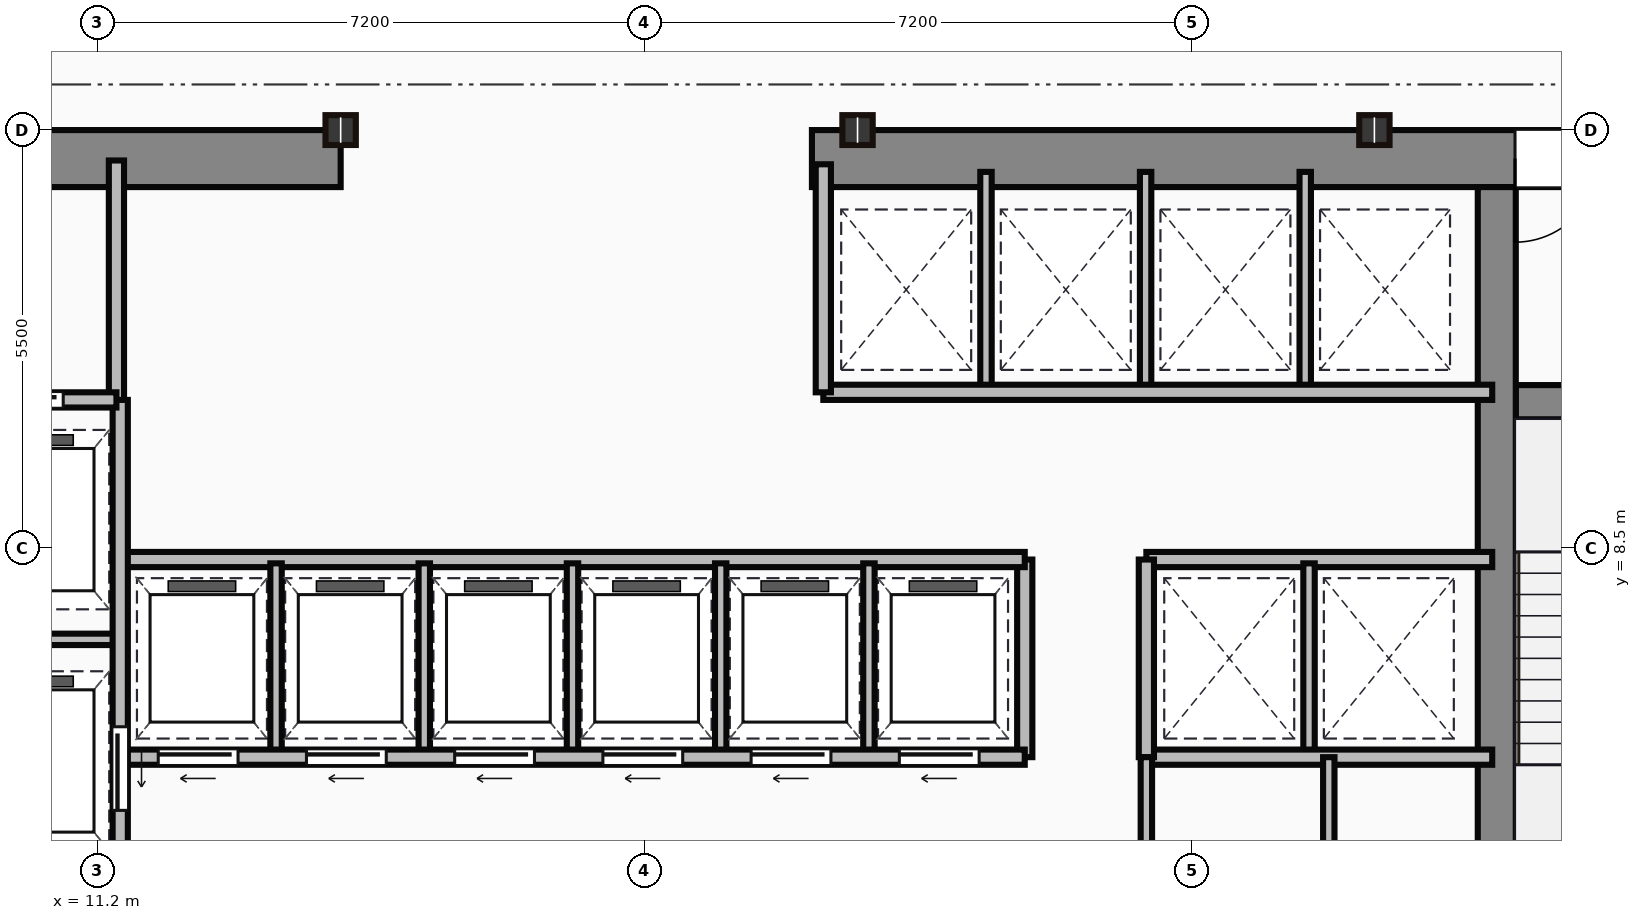
"""IFC4 building model, lengths in metres.
Left out: names, types, materials, properties, quantities, classifications, styles, units other than length and angle.
Written with IfcOpenShell. Run it as: python <this file> out.ifc"""

import sys

from ifc_helpers import new_model, si_unit, direction, frame, frame_2d, origin, origin_2d, place, context, subcontext, project, spatial, rectangle, i_section, extrude, source, transform, mapped, element, fill, save


model = new_model("IFC4")
c1 = context("Model", 3, precision=1e-05, world=origin(), true_north=direction((0.0, 1.0)))
c2 = subcontext(c1, "Body", "Model", "MODEL_VIEW")
j1 = project(units=[si_unit("LENGTHUNIT", "METRE"), si_unit("PLANEANGLEUNIT", "RADIAN")], contexts=[c1])
p1 = place(None, origin())
s1 = spatial("IfcSite", under=j1, at=p1, CompositionType="ELEMENT")
p2 = place(p1, origin())
s2 = spatial("IfcBuilding", under=s1, at=p2, CompositionType="ELEMENT")
p3 = place(p2, frame((0.0, 0.0, 114.2)))
s3 = spatial("IfcBuildingStorey", under=s2, at=p3, CompositionType="ELEMENT", Elevation=114.2)
m1 = source(origin(), c2, "Body", "SweptSolid", [
    extrude(rectangle(XDim=9.1, YDim=0.75, at=frame_2d((4.55, 0.0))), origin(), (0.0, 0.0, 1.0), 3.65),
])
p4 = place(p3, frame((5.3, 13.625, 0.0), z_axis=(0.0, 0.0, 1.0), x_axis=(1.0, 0.0, 0.0)))
e1 = element("IfcWall", 1, at=p4, inside=s3, PredefinedType="SHEAR", context=c2, shape_type="MappedRepresentation", body=[
    mapped(m1, transform((0.0, 0.0, 0.0))),
])
p5 = place(p4, frame((4.1, 0.0, 0.0)))
e2 = element("IfcOpeningElement", 2, at=p5, cuts=e1, PredefinedType="OPENING", context=c2, shape_type="SweptSolid", body=[
    extrude(rectangle(XDim=1.1, YDim=2.15, at=frame_2d((0.55, 1.075))), frame((0.0, 0.385, 0.0), z_axis=(0.0, -1.0, 0.0), x_axis=(1.0, 0.0, 0.0)), (0.0, 0.0, 1.0), 0.77),
])
m2 = source(origin(), c2, "Body", "SweptSolid", [
    extrude(rectangle(XDim=12.6, YDim=0.75, at=frame_2d((6.3, 0.0))), origin(), (0.0, 0.0, 1.0), 3.65),
])
p6 = place(p3, frame((20.6, 13.625, 0.0), z_axis=(0.0, 0.0, 1.0), x_axis=(1.0, 0.0, 0.0)))
e3 = element("IfcWall", 3, at=p6, inside=s3, PredefinedType="SHEAR", context=c2, shape_type="MappedRepresentation", body=[
    mapped(m2, transform((0.0, 0.0, 0.0))),
])
p7 = place(p6, frame((9.25, 0.0, 0.0)))
e4 = element("IfcOpeningElement", 4, at=p7, cuts=e3, PredefinedType="OPENING", context=c2, shape_type="SweptSolid", body=[
    extrude(rectangle(XDim=1.1, YDim=2.15, at=frame_2d((0.55, 1.075))), frame((0.0, 0.385, 0.0), z_axis=(0.0, -1.0, 0.0), x_axis=(1.0, 0.0, 0.0)), (0.0, 0.0, 1.0), 0.77),
])
m3 = source(origin(), c2, "Body", "SweptSolid", [
    extrude(rectangle(XDim=12.35, YDim=0.5, at=frame_2d((6.175, 0.0))), origin(), (0.0, 0.0, 1.0), 3.65),
])
p8 = place(p3, frame((29.61, 0.9, 0.0), z_axis=(0.0, 0.0, 1.0), x_axis=(0.0, 1.0, 0.0)))
e5 = element("IfcWall", 5, at=p8, inside=s3, PredefinedType="SHEAR", context=c2, shape_type="MappedRepresentation", body=[
    mapped(m3, transform((0.0, 0.0, 0.0))),
])
m4 = source(origin(), c2, "Body", "SweptSolid", [
    extrude(rectangle(XDim=3.39, YDim=0.45, at=frame_2d((1.695, 0.0))), origin(), (0.0, 0.0, 1.0), 3.65),
])
p9 = place(p3, frame((29.86, 10.42, 0.0), z_axis=(0.0, 0.0, 1.0), x_axis=(1.0, 0.0, 0.0)))
e6 = element("IfcWall", 6, at=p9, inside=s3, PredefinedType="SHEAR", context=c2, shape_type="MappedRepresentation", body=[
    mapped(m4, transform((0.0, 0.0, 0.0))),
])
p10 = place(p9, frame((1.1, 0.0, 0.0)))
e7 = element("IfcOpeningElement", 7, at=p10, cuts=e6, PredefinedType="OPENING", context=c2, shape_type="SweptSolid", body=[
    extrude(rectangle(XDim=1.1, YDim=2.15, at=frame_2d((0.55, 1.075))), frame((0.0, 0.235, 0.0), z_axis=(0.0, -1.0, 0.0), x_axis=(1.0, 0.0, 0.0)), (0.0, 0.0, 1.0), 0.47),
])
m5 = source(origin(), c2, "Body", "SweptSolid", [
    extrude(i_section(OverallWidth=0.399, OverallDepth=0.393, WebThickness=0.023, FlangeThickness=0.037, at=origin_2d()), origin(), (0.0, 0.0, 1.0), 3.65),
])
for number, where, z_axis, x_axis in (
    (8, (14.4, 14.0, 0.0), (0.0, 0.0, 1.0), (1.0, 0.0, 0.0)),
    (9, (21.2, 14.0, 0.0), (0.0, 0.0, 1.0), (1.0, 0.0, 0.0)),
    (10, (28.0, 14.0, 0.0), (0.0, 0.0, 1.0), (1.0, 0.0, 0.0)),
):
    element("IfcColumn", number, at=place(p3, frame(where, z_axis=z_axis, x_axis=x_axis)), inside=s3, PredefinedType="COLUMN", context=c2, shape_type="MappedRepresentation", body=[
        mapped(m5, transform((0.0, 0.0, 0.0))),
    ])
m6 = source(origin(), c2, "Body", "SweptSolid", [
    extrude(rectangle(XDim=3.18, YDim=0.2, at=frame_2d((1.59, 0.0))), origin(), (0.0, 0.0, 1.0), 3.4),
])
p11 = place(p3, frame((11.45, 10.42, 0.0), z_axis=(0.0, 0.0, 1.0), x_axis=(0.0, 1.0, 0.0)))
e11 = element("IfcWall", 11, at=p11, inside=s3, PredefinedType="PARTITIONING", context=c2, shape_type="MappedRepresentation", body=[
    mapped(m6, transform((0.0, 0.0, 0.0))),
])
m7 = source(origin(), c2, "Body", "SweptSolid", [
    extrude(rectangle(XDim=2.35, YDim=0.2, at=frame_2d((1.175, 0.0))), origin(), (0.0, 0.0, 1.0), 3.4),
])
p12 = place(p3, frame((9.1, 10.45, 0.0), z_axis=(0.0, 0.0, 1.0), x_axis=(1.0, 0.0, 0.0)))
e12 = element("IfcWall", 12, at=p12, inside=s3, PredefinedType="PARTITIONING", context=c2, shape_type="MappedRepresentation", body=[
    mapped(m7, transform((0.0, 0.0, 0.0))),
])
p13 = place(p12, frame((0.55, 0.0, 0.0)))
e13 = element("IfcOpeningElement", 13, at=p13, cuts=e12, PredefinedType="OPENING", context=c2, shape_type="SweptSolid", body=[
    extrude(rectangle(XDim=1.1, YDim=2.15, at=frame_2d((0.55, 1.075))), frame((0.0, 0.11, 0.0), z_axis=(0.0, -1.0, 0.0), x_axis=(1.0, 0.0, 0.0)), (0.0, 0.0, 1.0), 0.22),
])
m8 = source(origin(), c2, "Body", "SweptSolid", [
    extrude(rectangle(XDim=9.6, YDim=0.2, at=frame_2d((4.8, 0.0))), origin(), (0.0, 0.0, 1.0), 3.4),
])
p14 = place(p3, frame((11.5, 0.85, 0.0), z_axis=(0.0, 0.0, 1.0), x_axis=(0.0, 1.0, 0.0)))
e14 = element("IfcWall", 14, at=p14, inside=s3, PredefinedType="PARTITIONING", context=c2, shape_type="MappedRepresentation", body=[
    mapped(m8, transform((0.0, 0.0, 0.0))),
])
p15 = place(p14, frame((4.2, 0.0, 0.0)))
e15 = element("IfcOpeningElement", 15, at=p15, cuts=e14, PredefinedType="OPENING", context=c2, shape_type="SweptSolid", body=[
    extrude(rectangle(XDim=1.1, YDim=2.15, at=frame_2d((0.55, 1.075))), frame((0.0, 0.11, 0.0), z_axis=(0.0, -1.0, 0.0), x_axis=(1.0, 0.0, 0.0)), (0.0, 0.0, 1.0), 0.22),
])
p16 = place(p14, frame((0.9, 0.0, 0.0)))
e16 = element("IfcOpeningElement", 16, at=p16, cuts=e14, PredefinedType="OPENING", context=c2, shape_type="SweptSolid", body=[
    extrude(rectangle(XDim=1.2, YDim=2.15, at=frame_2d((0.6, 1.075))), frame((0.0, 0.11, 0.0), z_axis=(0.0, -1.0, 0.0), x_axis=(1.0, 0.0, 0.0)), (0.0, 0.0, 1.0), 0.22),
])
m9 = source(origin(), c2, "Body", "SweptSolid", [
    extrude(rectangle(XDim=2.4, YDim=0.15, at=frame_2d((1.2, 0.0))), origin(), (0.0, 0.0, 1.0), 3.4),
])
p17 = place(p3, frame((9.1, 7.3, 0.0), z_axis=(0.0, 0.0, 1.0), x_axis=(1.0, 0.0, 0.0)))
e17 = element("IfcWall", 17, at=p17, inside=s3, PredefinedType="PARTITIONING", context=c2, shape_type="MappedRepresentation", body=[
    mapped(m9, transform((0.0, 0.0, 0.0))),
])
m10 = source(origin(), c2, "Body", "SweptSolid", [
    extrude(rectangle(XDim=11.85, YDim=0.2, at=frame_2d((5.925, 0.0))), origin(), (0.0, 0.0, 1.0), 3.4),
])
p18 = place(p3, frame((11.55, 5.75, 0.0), z_axis=(0.0, 0.0, 1.0), x_axis=(1.0, 0.0, 0.0)))
e18 = element("IfcWall", 18, at=p18, inside=s3, PredefinedType="PARTITIONING", context=c2, shape_type="MappedRepresentation", body=[
    mapped(m10, transform((0.0, 0.0, 0.0))),
])
p19 = place(p18, frame((0.45, 0.0, 0.0)))
e19 = element("IfcOpeningElement", 19, at=p19, cuts=e18, PredefinedType="OPENING", context=c2, shape_type="SweptSolid", body=[
    extrude(rectangle(XDim=1.05, YDim=2.15, at=frame_2d((0.525, 1.075))), frame((0.0, 0.11, 0.0), z_axis=(0.0, -1.0, 0.0), x_axis=(1.0, 0.0, 0.0)), (0.0, 0.0, 1.0), 0.22),
])
p20 = place(p18, frame((2.4, 0.0, 0.0)))
e20 = element("IfcOpeningElement", 20, at=p20, cuts=e18, PredefinedType="OPENING", context=c2, shape_type="SweptSolid", body=[
    extrude(rectangle(XDim=1.05, YDim=2.15, at=frame_2d((0.525, 1.075))), frame((0.0, 0.11, 0.0), z_axis=(0.0, -1.0, 0.0), x_axis=(1.0, 0.0, 0.0)), (0.0, 0.0, 1.0), 0.22),
])
p21 = place(p18, frame((4.35, 0.0, 0.0)))
e21 = element("IfcOpeningElement", 21, at=p21, cuts=e18, PredefinedType="OPENING", context=c2, shape_type="SweptSolid", body=[
    extrude(rectangle(XDim=1.05, YDim=2.15, at=frame_2d((0.525, 1.075))), frame((0.0, 0.11, 0.0), z_axis=(0.0, -1.0, 0.0), x_axis=(1.0, 0.0, 0.0)), (0.0, 0.0, 1.0), 0.22),
])
p22 = place(p18, frame((6.3, 0.0, 0.0)))
e22 = element("IfcOpeningElement", 22, at=p22, cuts=e18, PredefinedType="OPENING", context=c2, shape_type="SweptSolid", body=[
    extrude(rectangle(XDim=1.05, YDim=2.15, at=frame_2d((0.525, 1.075))), frame((0.0, 0.11, 0.0), z_axis=(0.0, -1.0, 0.0), x_axis=(1.0, 0.0, 0.0)), (0.0, 0.0, 1.0), 0.22),
])
p23 = place(p18, frame((8.25, 0.0, 0.0)))
e23 = element("IfcOpeningElement", 23, at=p23, cuts=e18, PredefinedType="OPENING", context=c2, shape_type="SweptSolid", body=[
    extrude(rectangle(XDim=1.05, YDim=2.15, at=frame_2d((0.525, 1.075))), frame((0.0, 0.11, 0.0), z_axis=(0.0, -1.0, 0.0), x_axis=(1.0, 0.0, 0.0)), (0.0, 0.0, 1.0), 0.22),
])
p24 = place(p18, frame((10.2, 0.0, 0.0)))
e24 = element("IfcOpeningElement", 24, at=p24, cuts=e18, PredefinedType="OPENING", context=c2, shape_type="SweptSolid", body=[
    extrude(rectangle(XDim=1.05, YDim=2.15, at=frame_2d((0.525, 1.075))), frame((0.0, 0.11, 0.0), z_axis=(0.0, -1.0, 0.0), x_axis=(1.0, 0.0, 0.0)), (0.0, 0.0, 1.0), 0.22),
])
p25 = place(p3, frame((11.55, 8.35, 0.0), z_axis=(0.0, 0.0, 1.0), x_axis=(1.0, 0.0, 0.0)))
e25 = element("IfcWall", 25, at=p25, inside=s3, PredefinedType="PARTITIONING", context=c2, shape_type="MappedRepresentation", body=[
    mapped(m10, transform((0.0, 0.0, 0.0))),
])
m11 = source(origin(), c2, "Body", "SweptSolid", [
    extrude(rectangle(XDim=2.6, YDim=0.2, at=frame_2d((1.3, 0.0))), origin(), (0.0, 0.0, 1.0), 3.4),
])
p26 = place(p3, frame((23.4, 5.75, 0.0), z_axis=(0.0, 0.0, 1.0), x_axis=(0.0, 1.0, 0.0)))
e26 = element("IfcWall", 26, at=p26, inside=s3, PredefinedType="PARTITIONING", context=c2, shape_type="MappedRepresentation", body=[
    mapped(m11, transform((0.0, 0.0, 0.0))),
])
m12 = source(origin(), c2, "Body", "SweptSolid", [
    extrude(rectangle(XDim=2.5, YDim=0.15, at=frame_2d((1.25, 0.0))), origin(), (0.0, 0.0, 1.0), 3.4),
])
for number, where, z_axis, x_axis in (
    (27, (13.55, 5.8, 0.0), (0.0, 0.0, 1.0), (0.0, 1.0, 0.0)),
    (28, (15.5, 5.8, 0.0), (0.0, 0.0, 1.0), (0.0, 1.0, 0.0)),
    (29, (17.45, 5.8, 0.0), (0.0, 0.0, 1.0), (0.0, 1.0, 0.0)),
    (30, (19.4, 5.8, 0.0), (0.0, 0.0, 1.0), (0.0, 1.0, 0.0)),
    (31, (21.35, 5.8, 0.0), (0.0, 0.0, 1.0), (0.0, 1.0, 0.0)),
):
    element("IfcWall", number, at=place(p3, frame(where, z_axis=z_axis, x_axis=x_axis)), inside=s3, PredefinedType="PARTITIONING", context=c2, shape_type="MappedRepresentation", body=[
        mapped(m12, transform((0.0, 0.0, 0.0))),
    ])
m13 = source(origin(), c2, "Body", "SweptSolid", [
    extrude(rectangle(XDim=8.8, YDim=0.2, at=frame_2d((4.4, 0.0))), origin(), (0.0, 0.0, 1.0), 3.4),
])
p27 = place(p3, frame((20.75, 10.55, 0.0), z_axis=(0.0, 0.0, 1.0), x_axis=(1.0, 0.0, 0.0)))
e32 = element("IfcWall", 32, at=p27, inside=s3, PredefinedType="PARTITIONING", context=c2, shape_type="MappedRepresentation", body=[
    mapped(m13, transform((0.0, 0.0, 0.0))),
])
m14 = source(origin(), c2, "Body", "SweptSolid", [
    extrude(rectangle(XDim=3.0, YDim=0.2, at=frame_2d((1.5, 0.0))), origin(), (0.0, 0.0, 1.0), 3.4),
])
p28 = place(p3, frame((20.75, 10.55, 0.0), z_axis=(0.0, 0.0, 1.0), x_axis=(0.0, 1.0, 0.0)))
e33 = element("IfcWall", 33, at=p28, inside=s3, PredefinedType="PARTITIONING", context=c2, shape_type="MappedRepresentation", body=[
    mapped(m14, transform((0.0, 0.0, 0.0))),
])
m15 = source(origin(), c2, "Body", "SweptSolid", [
    extrude(rectangle(XDim=2.85, YDim=0.15, at=frame_2d((1.425, 0.0))), origin(), (0.0, 0.0, 1.0), 3.4),
])
for number, where, z_axis, x_axis in (
    (34, (22.89, 10.6, 0.0), (0.0, 0.0, 1.0), (0.0, 1.0, 0.0)),
    (35, (24.99, 10.6, 0.0), (0.0, 0.0, 1.0), (0.0, 1.0, 0.0)),
    (36, (27.09, 10.6, 0.0), (0.0, 0.0, 1.0), (0.0, 1.0, 0.0)),
):
    element("IfcWall", number, at=place(p3, frame(where, z_axis=z_axis, x_axis=x_axis)), inside=s3, PredefinedType="PARTITIONING", context=c2, shape_type="MappedRepresentation", body=[
        mapped(m15, transform((0.0, 0.0, 0.0))),
    ])
m16 = source(origin(), c2, "Body", "SweptSolid", [
    extrude(rectangle(XDim=4.55, YDim=0.2, at=frame_2d((2.275, 0.0))), origin(), (0.0, 0.0, 1.0), 3.4),
])
for number, where, z_axis, x_axis in (
    (37, (25.0, 8.35, 0.0), (0.0, 0.0, 1.0), (1.0, 0.0, 0.0)),
    (38, (25.0, 5.75, 0.0), (0.0, 0.0, 1.0), (1.0, 0.0, 0.0)),
):
    element("IfcWall", number, at=place(p3, frame(where, z_axis=z_axis, x_axis=x_axis)), inside=s3, PredefinedType="PARTITIONING", context=c2, shape_type="MappedRepresentation", body=[
        mapped(m16, transform((0.0, 0.0, 0.0))),
    ])
p29 = place(p3, frame((25.0, 5.75, 0.0), z_axis=(0.0, 0.0, 1.0), x_axis=(0.0, 1.0, 0.0)))
e39 = element("IfcWall", 39, at=p29, inside=s3, PredefinedType="PARTITIONING", context=c2, shape_type="MappedRepresentation", body=[
    mapped(m11, transform((0.0, 0.0, 0.0))),
])
p30 = place(p3, frame((27.14, 5.8, 0.0), z_axis=(0.0, 0.0, 1.0), x_axis=(0.0, 1.0, 0.0)))
e40 = element("IfcWall", 40, at=p30, inside=s3, PredefinedType="PARTITIONING", context=c2, shape_type="MappedRepresentation", body=[
    mapped(m12, transform((0.0, 0.0, 0.0))),
])
m17 = source(origin(), c2, "Body", "SweptSolid", [
    extrude(rectangle(XDim=4.9, YDim=0.15, at=frame_2d((2.45, 0.0))), origin(), (0.0, 0.0, 1.0), 3.4),
])
p31 = place(p3, frame((25.0, 0.85, 0.0), z_axis=(0.0, 0.0, 1.0), x_axis=(0.0, 1.0, 0.0)))
e41 = element("IfcWall", 41, at=p31, inside=s3, PredefinedType="PARTITIONING", context=c2, shape_type="MappedRepresentation", body=[
    mapped(m17, transform((0.0, 0.0, 0.0))),
])
p32 = place(p31, frame((2.5, 0.0, 0.0)))
e42 = element("IfcOpeningElement", 42, at=p32, cuts=e41, PredefinedType="OPENING", context=c2, shape_type="SweptSolid", body=[
    extrude(rectangle(XDim=0.95, YDim=2.15, at=frame_2d((0.475, 1.075))), frame((0.0, 0.085, 0.0), z_axis=(0.0, -1.0, 0.0), x_axis=(1.0, 0.0, 0.0)), (0.0, 0.0, 1.0), 0.17),
])
m18 = source(origin(), c2, "Body", "SweptSolid", [
    extrude(rectangle(XDim=3.4, YDim=0.15, at=frame_2d((1.7, 0.0))), origin(), (0.0, 0.0, 1.0), 3.4),
])
p33 = place(p3, frame((27.4, 2.35, 0.0), z_axis=(0.0, 0.0, 1.0), x_axis=(0.0, 1.0, 0.0)))
e43 = element("IfcWall", 43, at=p33, inside=s3, PredefinedType="PARTITIONING", context=c2, shape_type="MappedRepresentation", body=[
    mapped(m18, transform((0.0, 0.0, 0.0))),
])
p34 = place(p33, frame((1.1, 0.0, 0.0)))
e44 = element("IfcOpeningElement", 44, at=p34, cuts=e43, PredefinedType="OPENING", context=c2, shape_type="SweptSolid", body=[
    extrude(rectangle(XDim=0.85, YDim=2.1, at=frame_2d((0.425, 1.05))), frame((0.0, 0.085, 0.0), z_axis=(0.0, -1.0, 0.0), x_axis=(1.0, 0.0, 0.0)), (0.0, 0.0, 1.0), 0.17),
])
m19 = source(origin(), c2, "Body", "SweptSolid", [
    extrude(rectangle(XDim=1.1, YDim=2.15, at=frame_2d((0.55, 1.075))), frame((0.0, 0.025, 0.0), z_axis=(0.0, -1.0, 0.0), x_axis=(1.0, 0.0, 0.0)), (0.0, 0.0, 1.0), 0.05),
])
p35 = place(p7, origin())
e45 = element("IfcDoor", 45, at=p35, inside=s3, OperationType="SINGLE_SWING_LEFT", PredefinedType="DOOR", context=c2, shape_type="MappedRepresentation", body=[
    mapped(m19, transform((0.0, 0.0, 0.0))),
])
fill(e4, e45)
p36 = place(p13, origin())
e46 = element("IfcDoor", 46, at=p36, inside=s3, OperationType="SLIDING_TO_LEFT", PredefinedType="DOOR", context=c2, shape_type="MappedRepresentation", body=[
    mapped(m19, transform((0.0, 0.0, 0.0))),
])
fill(e13, e46)
p37 = place(p15, frame((1.1, 0.0, 0.0), z_axis=(0.0, 0.0, 1.0), x_axis=(-1.0, 0.0, 0.0)))
e47 = element("IfcDoor", 47, at=p37, inside=s3, OperationType="SLIDING_TO_LEFT", PredefinedType="DOOR", context=c2, shape_type="MappedRepresentation", body=[
    mapped(m19, transform((0.0, 0.0, 0.0))),
])
fill(e15, e47)
m20 = source(origin(), c2, "Body", "SweptSolid", [
    extrude(rectangle(XDim=1.05, YDim=2.15, at=frame_2d((0.525, 1.075))), frame((0.0, 0.025, 0.0), z_axis=(0.0, -1.0, 0.0), x_axis=(1.0, 0.0, 0.0)), (0.0, 0.0, 1.0), 0.05),
])
p38 = place(p19, frame((1.05, 0.0, 0.0), z_axis=(0.0, 0.0, 1.0), x_axis=(-1.0, 0.0, 0.0)))
e48 = element("IfcDoor", 48, at=p38, inside=s3, OperationType="SLIDING_TO_LEFT", PredefinedType="DOOR", context=c2, shape_type="MappedRepresentation", body=[
    mapped(m20, transform((0.0, 0.0, 0.0))),
])
fill(e19, e48)
p39 = place(p20, frame((1.05, 0.0, 0.0), z_axis=(0.0, 0.0, 1.0), x_axis=(-1.0, 0.0, 0.0)))
e49 = element("IfcDoor", 49, at=p39, inside=s3, OperationType="SLIDING_TO_LEFT", PredefinedType="DOOR", context=c2, shape_type="MappedRepresentation", body=[
    mapped(m20, transform((0.0, 0.0, 0.0))),
])
fill(e20, e49)
p40 = place(p21, frame((1.05, 0.0, 0.0), z_axis=(0.0, 0.0, 1.0), x_axis=(-1.0, 0.0, 0.0)))
e50 = element("IfcDoor", 50, at=p40, inside=s3, OperationType="SLIDING_TO_LEFT", PredefinedType="DOOR", context=c2, shape_type="MappedRepresentation", body=[
    mapped(m20, transform((0.0, 0.0, 0.0))),
])
fill(e21, e50)
p41 = place(p22, frame((1.05, 0.0, 0.0), z_axis=(0.0, 0.0, 1.0), x_axis=(-1.0, 0.0, 0.0)))
e51 = element("IfcDoor", 51, at=p41, inside=s3, OperationType="SLIDING_TO_LEFT", PredefinedType="DOOR", context=c2, shape_type="MappedRepresentation", body=[
    mapped(m20, transform((0.0, 0.0, 0.0))),
])
fill(e22, e51)
p42 = place(p23, frame((1.05, 0.0, 0.0), z_axis=(0.0, 0.0, 1.0), x_axis=(-1.0, 0.0, 0.0)))
e52 = element("IfcDoor", 52, at=p42, inside=s3, OperationType="SLIDING_TO_LEFT", PredefinedType="DOOR", context=c2, shape_type="MappedRepresentation", body=[
    mapped(m20, transform((0.0, 0.0, 0.0))),
])
fill(e23, e52)
p43 = place(p24, frame((1.05, 0.0, 0.0), z_axis=(0.0, 0.0, 1.0), x_axis=(-1.0, 0.0, 0.0)))
e53 = element("IfcDoor", 53, at=p43, inside=s3, OperationType="SLIDING_TO_LEFT", PredefinedType="DOOR", context=c2, shape_type="MappedRepresentation", body=[
    mapped(m20, transform((0.0, 0.0, 0.0))),
])
fill(e24, e53)
save(model, sys.argv[1])
